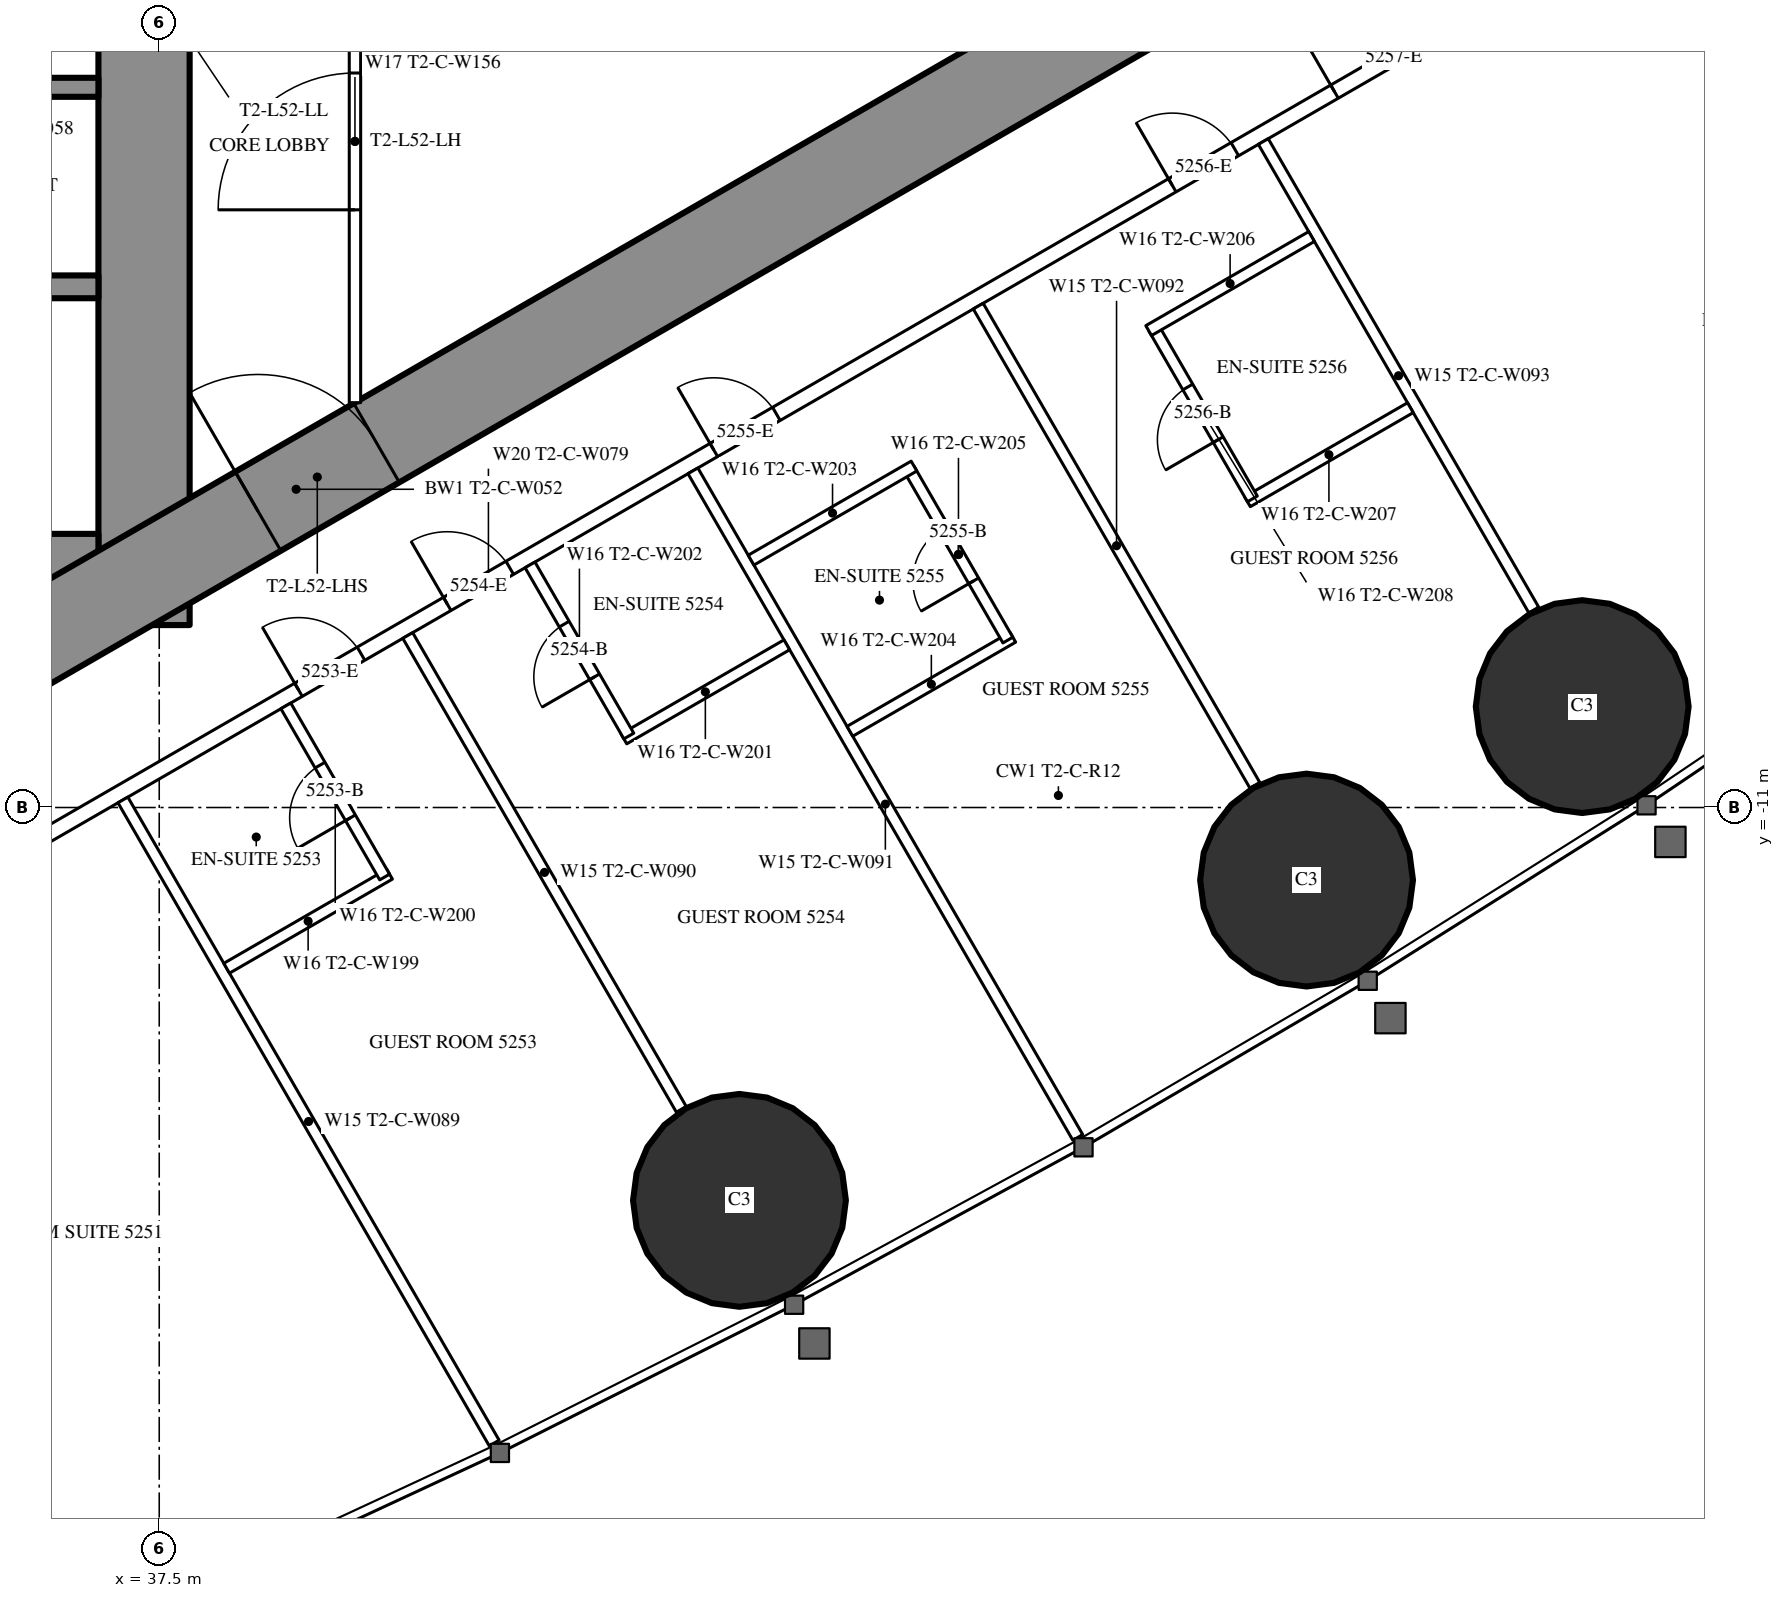
"""IFC4 building model, lengths in metres.
Left out: names, types, materials, properties, quantities, classifications, styles, units other than length and angle.
Written with IfcOpenShell. Run it as: python <this file> out.ifc"""

import sys

from ifc_helpers import new_model, si_unit, direction, frame, frame_2d, origin, origin_2d, place, context, subcontext, project, spatial, rectangle, circle, extrude, element, fill, save


model = new_model("IFC4")
c1 = context("Model", 3, precision=1e-05, world=origin(), true_north=direction((0.0, 1.0)))
c2 = subcontext(c1, "Body", "Model", "MODEL_VIEW")
j1 = project(units=[si_unit("LENGTHUNIT", "METRE"), si_unit("PLANEANGLEUNIT", "RADIAN")], contexts=[c1])
p1 = place(None, origin())
s1 = spatial("IfcSite", under=j1, at=p1, CompositionType="ELEMENT")
p2 = place(p1, origin())
s2 = spatial("IfcBuilding", under=s1, at=p2, CompositionType="ELEMENT")
p3 = place(p2, frame((0.0, 0.0, 194.8)))
s3 = spatial("IfcBuildingStorey", under=s2, at=p3, CompositionType="ELEMENT", Elevation=194.8)
for number, where, z_axis, x_axis in (
    (1, (45.134, -16.168, 0.0), (0.0, 0.0, 1.0), (1.0, 0.0, 0.0)),
    (2, (52.594, -11.955, 0.0), (0.0, 0.0, 1.0), (1.0, 0.0, 0.0)),
    (3, (56.221, -9.672, 0.0), (0.0, 0.0, 1.0), (1.0, 0.0, 0.0)),
):
    element("IfcColumn", number, at=place(p3, frame(where, z_axis=z_axis, x_axis=x_axis)), inside=s3, PredefinedType="COLUMN", context=c2, shape_type="SweptSolid", body=[
        extrude(circle(Radius=1.4, at=origin_2d()), origin(), (0.0, 0.0, 1.0), 3.5),
    ])
p4 = place(p3, frame((37.3, -8.6, 0.0), z_axis=(0.0, 0.0, 1.0), x_axis=(0.0, 1.0, 0.0)))
e4 = element("IfcWall", 4, at=p4, inside=s3, PredefinedType="SHEAR", context=c2, shape_type="SweptSolid", body=[
    extrude(rectangle(XDim=17.2, YDim=1.2, at=frame_2d((8.6, 0.0))), origin(), (0.0, 0.0, 1.0), 3.5),
])
p5 = place(p4, frame((7.7, 0.0, 0.0)))
e5 = element("IfcOpeningElement", 5, at=p5, cuts=e4, PredefinedType="OPENING", context=c2, shape_type="SweptSolid", body=[
    extrude(rectangle(XDim=1.8, YDim=2.2, at=frame_2d((0.9, 1.1))), frame((0.0, 0.61, 0.0), z_axis=(0.0, -1.0, 0.0), x_axis=(1.0, 0.0, 0.0)), (0.0, 0.0, 1.0), 1.22),
])
p6 = place(p3, frame((28.3, -8.0, 0.0), z_axis=(0.0, 0.0, 1.0), x_axis=(1.0, 0.0, 0.0)))
e6 = element("IfcWall", 6, at=p6, inside=s3, PredefinedType="SHEAR", context=c2, shape_type="SweptSolid", body=[
    extrude(rectangle(XDim=8.4, YDim=1.2, at=frame_2d((4.2, 0.0))), origin(), (0.0, 0.0, 1.0), 3.5),
])
p7 = place(p6, frame((0.25, 0.0, 0.0)))
e7 = element("IfcOpeningElement", 7, at=p7, cuts=e6, PredefinedType="OPENING", context=c2, shape_type="SweptSolid", body=[
    extrude(rectangle(XDim=1.0, YDim=2.2, at=frame_2d((0.5, 1.1))), frame((0.0, 0.61, 0.0), z_axis=(0.0, -1.0, 0.0), x_axis=(1.0, 0.0, 0.0)), (0.0, 0.0, 1.0), 1.22),
])
p8 = place(p3, frame((28.3, -4.15, 0.0), z_axis=(0.0, 0.0, 1.0), x_axis=(1.0, 0.0, 0.0)))
e8 = element("IfcWall", 8, at=p8, inside=s3, PredefinedType="SHEAR", context=c2, shape_type="SweptSolid", body=[
    extrude(rectangle(XDim=8.4, YDim=0.3, at=frame_2d((4.2, 0.0))), origin(), (0.0, 0.0, 1.0), 3.5),
])
p9 = place(p3, frame((34.25, -1.525, 0.0), z_axis=(0.0, 0.0, 1.0), x_axis=(1.0, 0.0, 0.0)))
e9 = element("IfcWall", 9, at=p9, inside=s3, PredefinedType="SHEAR", context=c2, shape_type="SweptSolid", body=[
    extrude(rectangle(XDim=2.45, YDim=0.25, at=frame_2d((1.225, 0.0))), origin(), (0.0, 0.0, 1.0), 3.5),
])
p10 = place(p3, frame((27.2, -13.8, 0.0), z_axis=(0.0, 0.0, 1.0), x_axis=(0.866027159892, 0.499996958321, 0.0)))
e10 = element("IfcWall", 10, at=p10, inside=s3, PredefinedType="SHEAR", context=c2, shape_type="SweptSolid", body=[
    extrude(rectangle(XDim=27.947, YDim=1.2, at=frame_2d((13.973, 0.0))), origin(), (0.0, 0.0, 1.0), 3.5),
])
p11 = place(p10, frame((4.6, 0.0, 0.0)))
e11 = element("IfcOpeningElement", 11, at=p11, cuts=e10, PredefinedType="OPENING", context=c2, shape_type="SweptSolid", body=[
    extrude(rectangle(XDim=1.0, YDim=2.2, at=frame_2d((0.5, 1.1))), frame((0.0, 0.61, 0.0), z_axis=(0.0, -1.0, 0.0), x_axis=(1.0, 0.0, 0.0)), (0.0, 0.0, 1.0), 1.22),
])
p12 = place(p10, frame((13.395, 0.0, 0.0)))
e12 = element("IfcOpeningElement", 12, at=p12, cuts=e10, PredefinedType="OPENING", context=c2, shape_type="SweptSolid", body=[
    extrude(rectangle(XDim=1.8, YDim=2.2, at=frame_2d((0.9, 1.1))), frame((0.0, 0.61, 0.0), z_axis=(0.0, -1.0, 0.0), x_axis=(1.0, 0.0, 0.0)), (0.0, 0.0, 1.0), 1.22),
])
p13 = place(p3, frame((27.959, -16.017, 0.0), z_axis=(0.0, 0.0, 1.0), x_axis=(0.866024151371, 0.500002169237, 0.0)))
e13 = element("IfcWall", 13, at=p13, inside=s3, PredefinedType="PARTITIONING", context=c2, shape_type="SweptSolid", body=[
    extrude(rectangle(XDim=32.034, YDim=0.2, at=frame_2d((16.017, 0.0))), origin(), (0.0, 0.0, 1.0), 3.25),
])
p14 = place(p13, frame((0.6, 0.0, 0.0)))
e14 = element("IfcOpeningElement", 14, at=p14, cuts=e13, PredefinedType="OPENING", context=c2, shape_type="SweptSolid", body=[
    extrude(rectangle(XDim=0.95, YDim=2.2, at=frame_2d((0.475, 1.1))), frame((0.0, 0.11, 0.0), z_axis=(0.0, -1.0, 0.0), x_axis=(1.0, 0.0, 0.0)), (0.0, 0.0, 1.0), 0.22),
])
p15 = place(p13, frame((13.132, 0.0, 0.0)))
e15 = element("IfcOpeningElement", 15, at=p15, cuts=e13, PredefinedType="OPENING", context=c2, shape_type="SweptSolid", body=[
    extrude(rectangle(XDim=0.95, YDim=2.2, at=frame_2d((0.475, 1.1))), frame((0.0, 0.11, 0.0), z_axis=(0.0, -1.0, 0.0), x_axis=(1.0, 0.0, 0.0)), (0.0, 0.0, 1.0), 0.22),
])
p16 = place(p13, frame((15.391, 0.0, 0.0)))
e16 = element("IfcOpeningElement", 16, at=p16, cuts=e13, PredefinedType="OPENING", context=c2, shape_type="SweptSolid", body=[
    extrude(rectangle(XDim=0.95, YDim=2.2, at=frame_2d((0.475, 1.1))), frame((0.0, 0.11, 0.0), z_axis=(0.0, -1.0, 0.0), x_axis=(1.0, 0.0, 0.0)), (0.0, 0.0, 1.0), 0.22),
])
p17 = place(p13, frame((19.441, 0.0, 0.0)))
e17 = element("IfcOpeningElement", 17, at=p17, cuts=e13, PredefinedType="OPENING", context=c2, shape_type="SweptSolid", body=[
    extrude(rectangle(XDim=0.95, YDim=2.2, at=frame_2d((0.475, 1.1))), frame((0.0, 0.11, 0.0), z_axis=(0.0, -1.0, 0.0), x_axis=(1.0, 0.0, 0.0)), (0.0, 0.0, 1.0), 0.22),
])
p18 = place(p13, frame((26.406, 0.0, 0.0)))
e18 = element("IfcOpeningElement", 18, at=p18, cuts=e13, PredefinedType="OPENING", context=c2, shape_type="SweptSolid", body=[
    extrude(rectangle(XDim=0.95, YDim=2.2, at=frame_2d((0.475, 1.1))), frame((0.0, 0.11, 0.0), z_axis=(0.0, -1.0, 0.0), x_axis=(1.0, 0.0, 0.0)), (0.0, 0.0, 1.0), 0.22),
])
p19 = place(p13, frame((28.87, 0.0, 0.0)))
e19 = element("IfcOpeningElement", 19, at=p19, cuts=e13, PredefinedType="OPENING", context=c2, shape_type="SweptSolid", body=[
    extrude(rectangle(XDim=1.8, YDim=2.2, at=frame_2d((0.9, 1.1))), frame((0.0, 0.11, 0.0), z_axis=(0.0, -1.0, 0.0), x_axis=(1.0, 0.0, 0.0)), (0.0, 0.0, 1.0), 0.22),
])
p20 = place(p3, frame((37.022, -10.9, 0.0), z_axis=(0.0, 0.0, 1.0), x_axis=(0.499998620953, -0.866026199976, 0.0)))
e20 = element("IfcWall", 20, at=p20, inside=s3, PredefinedType="PARTITIONING", context=c2, shape_type="SweptSolid", body=[
    extrude(rectangle(XDim=9.77, YDim=0.15, at=frame_2d((4.885, 0.0))), origin(), (0.0, 0.0, 1.0), 3.25),
])
p21 = place(p3, frame((40.769, -8.737, 0.0), z_axis=(0.0, 0.0, 1.0), x_axis=(0.500013115284, -0.866017831539, 0.0)))
e21 = element("IfcWall", 21, at=p21, inside=s3, PredefinedType="PARTITIONING", context=c2, shape_type="SweptSolid", body=[
    extrude(rectangle(XDim=7.198, YDim=0.15, at=frame_2d((3.599, 0.0))), origin(), (0.0, 0.0, 1.0), 2.3),
])
p22 = place(p3, frame((44.521, -6.571, 0.0), z_axis=(0.0, 0.0, 1.0), x_axis=(0.500010457486, -0.866019366068, 0.0)))
e22 = element("IfcWall", 22, at=p22, inside=s3, PredefinedType="PARTITIONING", context=c2, shape_type="SweptSolid", body=[
    extrude(rectangle(XDim=10.126, YDim=0.15, at=frame_2d((5.063, 0.0))), origin(), (0.0, 0.0, 1.0), 3.25),
])
p23 = place(p3, frame((48.275, -4.404, 0.0), z_axis=(0.0, 0.0, 1.0), x_axis=(0.500006004368, -0.866021937133, 0.0)))
e23 = element("IfcWall", 23, at=p23, inside=s3, PredefinedType="PARTITIONING", context=c2, shape_type="SweptSolid", body=[
    extrude(rectangle(XDim=7.279, YDim=0.15, at=frame_2d((3.64, 0.0))), origin(), (0.0, 0.0, 1.0), 2.3),
])
p24 = place(p3, frame((52.025, -2.238, 0.0), z_axis=(0.0, 0.0, 1.0), x_axis=(0.499983785035, -0.866034765296, 0.0)))
e24 = element("IfcWall", 24, at=p24, inside=s3, PredefinedType="PARTITIONING", context=c2, shape_type="SweptSolid", body=[
    extrude(rectangle(XDim=7.116, YDim=0.15, at=frame_2d((3.558, 0.0))), origin(), (0.0, 0.0, 1.0), 2.3),
])
p25 = place(p3, frame((38.387, -13.115, 0.0), z_axis=(0.0, 0.0, 1.0), x_axis=(0.866073894602, 0.499916002032, 0.0)))
e25 = element("IfcWall", 25, at=p25, inside=s3, PredefinedType="PARTITIONING", context=c2, shape_type="SweptSolid", body=[
    extrude(rectangle(XDim=2.475, YDim=0.15, at=frame_2d((1.238, 0.0))), origin(), (0.0, 0.0, 1.0), 3.25),
])
p26 = place(p3, frame((39.166, -9.663, 0.0), z_axis=(0.0, 0.0, 1.0), x_axis=(0.500006934395, -0.866021400173, 0.0)))
e26 = element("IfcWall", 26, at=p26, inside=s3, PredefinedType="PARTITIONING", context=c2, shape_type="SweptSolid", body=[
    extrude(rectangle(XDim=2.6, YDim=0.15, at=frame_2d((1.3, 0.0))), origin(), (0.0, 0.0, 1.0), 3.25),
])
p27 = place(p26, frame((0.9, 0.0, 0.0)))
e27 = element("IfcOpeningElement", 27, at=p27, cuts=e26, PredefinedType="OPENING", context=c2, shape_type="SweptSolid", body=[
    extrude(rectangle(XDim=0.8, YDim=2.2, at=frame_2d((0.4, 1.1))), frame((0.0, 0.085, 0.0), z_axis=(0.0, -1.0, 0.0), x_axis=(1.0, 0.0, 0.0)), (0.0, 0.0, 1.0), 0.17),
])
p28 = place(p3, frame((43.613, -10.097, 0.0), z_axis=(0.0, 0.0, 1.0), x_axis=(0.866031185235, 0.4999899861, 0.0)))
e28 = element("IfcWall", 28, at=p28, inside=s3, PredefinedType="PARTITIONING", context=c2, shape_type="SweptSolid", body=[
    extrude(rectangle(XDim=2.475, YDim=0.15, at=frame_2d((1.238, 0.0))), origin(), (0.0, 0.0, 1.0), 3.25),
])
p29 = place(p3, frame((42.378, -7.808, 0.0), z_axis=(0.0, 0.0, 1.0), x_axis=(0.500006934395, -0.866021400173, 0.0)))
e29 = element("IfcWall", 29, at=p29, inside=s3, PredefinedType="PARTITIONING", context=c2, shape_type="SweptSolid", body=[
    extrude(rectangle(XDim=2.6, YDim=0.15, at=frame_2d((1.3, 0.0))), origin(), (0.0, 0.0, 1.0), 3.25),
])
p30 = place(p29, frame((0.9, 0.0, 0.0)))
e30 = element("IfcOpeningElement", 30, at=p30, cuts=e29, PredefinedType="OPENING", context=c2, shape_type="SweptSolid", body=[
    extrude(rectangle(XDim=0.8, YDim=2.2, at=frame_2d((0.4, 1.1))), frame((0.0, 0.085, 0.0), z_axis=(0.0, -1.0, 0.0), x_axis=(1.0, 0.0, 0.0)), (0.0, 0.0, 1.0), 0.17),
])
p31 = place(p3, frame((46.586, -9.997, 0.0), z_axis=(0.0, 0.0, 1.0), x_axis=(0.866006523861, 0.500032699561, 0.0)))
e31 = element("IfcWall", 31, at=p31, inside=s3, PredefinedType="PARTITIONING", context=c2, shape_type="SweptSolid", body=[
    extrude(rectangle(XDim=2.475, YDim=0.15, at=frame_2d((1.237, 0.0))), origin(), (0.0, 0.0, 1.0), 3.25),
])
p32 = place(p3, frame((47.365, -6.546, 0.0), z_axis=(0.0, 0.0, 1.0), x_axis=(0.500006934395, -0.866021400173, 0.0)))
e32 = element("IfcWall", 32, at=p32, inside=s3, PredefinedType="PARTITIONING", context=c2, shape_type="SweptSolid", body=[
    extrude(rectangle(XDim=2.6, YDim=0.15, at=frame_2d((1.3, 0.0))), origin(), (0.0, 0.0, 1.0), 3.25),
])
p33 = place(p32, frame((0.9, 0.0, 0.0)))
e33 = element("IfcOpeningElement", 33, at=p33, cuts=e32, PredefinedType="OPENING", context=c2, shape_type="SweptSolid", body=[
    extrude(rectangle(XDim=0.8, YDim=2.2, at=frame_2d((0.4, 1.1))), frame((0.0, 0.085, 0.0), z_axis=(0.0, -1.0, 0.0), x_axis=(1.0, 0.0, 0.0)), (0.0, 0.0, 1.0), 0.17),
])
for number, where, z_axis, x_axis in (
    (34, (45.286, -7.746, 0.0), (0.0, 0.0, 1.0), (0.866, 0.5, 0.0)),
    (35, (51.817, -6.978, 0.0), (0.0, 0.0, 1.0), (0.866, 0.5, 0.0)),
):
    element("IfcWall", number, at=place(p3, frame(where, z_axis=z_axis, x_axis=x_axis)), inside=s3, PredefinedType="PARTITIONING", context=c2, shape_type="SweptSolid", body=[
        extrude(rectangle(XDim=2.475, YDim=0.15, at=frame_2d((1.237, 0.0))), origin(), (0.0, 0.0, 1.0), 3.25),
    ])
p34 = place(p3, frame((50.582, -4.688, 0.0), z_axis=(0.0, 0.0, 1.0), x_axis=(0.500006934395, -0.866021400173, 0.0)))
e36 = element("IfcWall", 36, at=p34, inside=s3, PredefinedType="PARTITIONING", context=c2, shape_type="SweptSolid", body=[
    extrude(rectangle(XDim=2.6, YDim=0.15, at=frame_2d((1.3, 0.0))), origin(), (0.0, 0.0, 1.0), 3.25),
])
p35 = place(p34, frame((0.9, 0.0, 0.0)))
e37 = element("IfcOpeningElement", 37, at=p35, cuts=e36, PredefinedType="OPENING", context=c2, shape_type="SweptSolid", body=[
    extrude(rectangle(XDim=0.8, YDim=2.2, at=frame_2d((0.4, 1.1))), frame((0.0, 0.085, 0.0), z_axis=(0.0, -1.0, 0.0), x_axis=(1.0, 0.0, 0.0)), (0.0, 0.0, 1.0), 0.17),
])
p36 = place(p3, frame((50.517, -4.726, 0.0), z_axis=(0.0, 0.0, 1.0), x_axis=(0.866031185235, 0.4999899861, 0.0)))
e38 = element("IfcWall", 38, at=p36, inside=s3, PredefinedType="PARTITIONING", context=c2, shape_type="SweptSolid", body=[
    extrude(rectangle(XDim=2.475, YDim=0.15, at=frame_2d((1.238, 0.0))), origin(), (0.0, 0.0, 1.0), 3.25),
])
p37 = place(p3, frame((40.075, -5.674, 0.0), z_axis=(0.0, 0.0, 1.0), x_axis=(0.0, 1.0, 0.0)))
e39 = element("IfcWall", 39, at=p37, inside=s3, PredefinedType="PARTITIONING", context=c2, shape_type="SweptSolid", body=[
    extrude(rectangle(XDim=6.874, YDim=0.15, at=frame_2d((3.437, 0.0))), origin(), (0.0, 0.0, 1.0), 3.25),
])
p38 = place(p37, frame((2.537, 0.0, 0.0)))
e40 = element("IfcOpeningElement", 40, at=p38, cuts=e39, PredefinedType="OPENING", context=c2, shape_type="SweptSolid", body=[
    extrude(rectangle(XDim=1.8, YDim=2.2, at=frame_2d((0.9, 1.1))), frame((0.0, 0.085, 0.0), z_axis=(0.0, -1.0, 0.0), x_axis=(1.0, 0.0, 0.0)), (0.0, 0.0, 1.0), 0.17),
])
p39 = place(p27, origin())
e41 = element("IfcDoor", 41, at=p39, inside=s3, OperationType="SINGLE_SWING_RIGHT", PredefinedType="DOOR", context=c2, shape_type="SweptSolid", body=[
    extrude(rectangle(XDim=0.8, YDim=2.2, at=frame_2d((0.4, 1.1))), frame((0.0, 0.025, 0.0), z_axis=(0.0, -1.0, 0.0), x_axis=(1.0, 0.0, 0.0)), (0.0, 0.0, 1.0), 0.05),
])
fill(e27, e41)
p40 = place(p15, origin())
e42 = element("IfcDoor", 42, at=p40, inside=s3, OperationType="SINGLE_SWING_LEFT", PredefinedType="DOOR", context=c2, shape_type="SweptSolid", body=[
    extrude(rectangle(XDim=0.95, YDim=2.2, at=frame_2d((0.475, 1.1))), frame((0.0, 0.025, 0.0), z_axis=(0.0, -1.0, 0.0), x_axis=(1.0, 0.0, 0.0)), (0.0, 0.0, 1.0), 0.05),
])
fill(e15, e42)
p41 = place(p30, origin())
e43 = element("IfcDoor", 43, at=p41, inside=s3, OperationType="SINGLE_SWING_RIGHT", PredefinedType="DOOR", context=c2, shape_type="SweptSolid", body=[
    extrude(rectangle(XDim=0.8, YDim=2.2, at=frame_2d((0.4, 1.1))), frame((0.0, 0.025, 0.0), z_axis=(0.0, -1.0, 0.0), x_axis=(1.0, 0.0, 0.0)), (0.0, 0.0, 1.0), 0.05),
])
fill(e30, e43)
p42 = place(p16, origin())
e44 = element("IfcDoor", 44, at=p42, inside=s3, OperationType="SINGLE_SWING_LEFT", PredefinedType="DOOR", context=c2, shape_type="SweptSolid", body=[
    extrude(rectangle(XDim=0.95, YDim=2.2, at=frame_2d((0.475, 1.1))), frame((0.0, 0.025, 0.0), z_axis=(0.0, -1.0, 0.0), x_axis=(1.0, 0.0, 0.0)), (0.0, 0.0, 1.0), 0.05),
])
fill(e16, e44)
p43 = place(p33, origin())
e45 = element("IfcDoor", 45, at=p43, inside=s3, OperationType="SINGLE_SWING_RIGHT", PredefinedType="DOOR", context=c2, shape_type="SweptSolid", body=[
    extrude(rectangle(XDim=0.8, YDim=2.2, at=frame_2d((0.4, 1.1))), frame((0.0, 0.025, 0.0), z_axis=(0.0, -1.0, 0.0), x_axis=(1.0, 0.0, 0.0)), (0.0, 0.0, 1.0), 0.05),
])
fill(e33, e45)
p44 = place(p17, origin())
e46 = element("IfcDoor", 46, at=p44, inside=s3, OperationType="SINGLE_SWING_LEFT", PredefinedType="DOOR", context=c2, shape_type="SweptSolid", body=[
    extrude(rectangle(XDim=0.95, YDim=2.2, at=frame_2d((0.475, 1.1))), frame((0.0, 0.025, 0.0), z_axis=(0.0, -1.0, 0.0), x_axis=(1.0, 0.0, 0.0)), (0.0, 0.0, 1.0), 0.05),
])
fill(e17, e46)
p45 = place(p35, origin())
e47 = element("IfcDoor", 47, at=p45, inside=s3, OperationType="SINGLE_SWING_RIGHT", PredefinedType="DOOR", context=c2, shape_type="SweptSolid", body=[
    extrude(rectangle(XDim=0.8, YDim=2.2, at=frame_2d((0.4, 1.1))), frame((0.0, 0.025, 0.0), z_axis=(0.0, -1.0, 0.0), x_axis=(1.0, 0.0, 0.0)), (0.0, 0.0, 1.0), 0.05),
])
fill(e37, e47)
p46 = place(p18, origin())
e48 = element("IfcDoor", 48, at=p46, inside=s3, OperationType="SINGLE_SWING_LEFT", PredefinedType="DOOR", context=c2, shape_type="SweptSolid", body=[
    extrude(rectangle(XDim=0.95, YDim=2.2, at=frame_2d((0.475, 1.1))), frame((0.0, 0.025, 0.0), z_axis=(0.0, -1.0, 0.0), x_axis=(1.0, 0.0, 0.0)), (0.0, 0.0, 1.0), 0.05),
])
fill(e18, e48)
p47 = place(p19, origin())
e49 = element("IfcDoor", 49, at=p47, inside=s3, OperationType="DOUBLE_DOOR_SINGLE_SWING", PredefinedType="DOOR", context=c2, shape_type="SweptSolid", body=[
    extrude(rectangle(XDim=1.8, YDim=2.2, at=frame_2d((0.9, 1.1))), frame((0.0, 0.025, 0.0), z_axis=(0.0, -1.0, 0.0), x_axis=(1.0, 0.0, 0.0)), (0.0, 0.0, 1.0), 0.05),
])
fill(e19, e49)
p48 = place(p38, origin())
e50 = element("IfcDoor", 50, at=p48, inside=s3, OperationType="DOUBLE_DOOR_SINGLE_SWING", PredefinedType="DOOR", context=c2, shape_type="SweptSolid", body=[
    extrude(rectangle(XDim=1.8, YDim=2.2, at=frame_2d((0.9, 1.1))), frame((0.0, 0.025, 0.0), z_axis=(0.0, -1.0, 0.0), x_axis=(1.0, 0.0, 0.0)), (0.0, 0.0, 1.0), 0.05),
])
fill(e40, e50)
p49 = place(p12, origin())
e51 = element("IfcDoor", 51, at=p49, inside=s3, OperationType="DOUBLE_DOOR_SINGLE_SWING", PredefinedType="DOOR", context=c2, shape_type="SweptSolid", body=[
    extrude(rectangle(XDim=1.8, YDim=2.2, at=frame_2d((0.9, 1.1))), frame((0.0, 0.025, 0.0), z_axis=(0.0, -1.0, 0.0), x_axis=(1.0, 0.0, 0.0)), (0.0, 0.0, 1.0), 0.05),
])
fill(e12, e51)
save(model, sys.argv[1])
